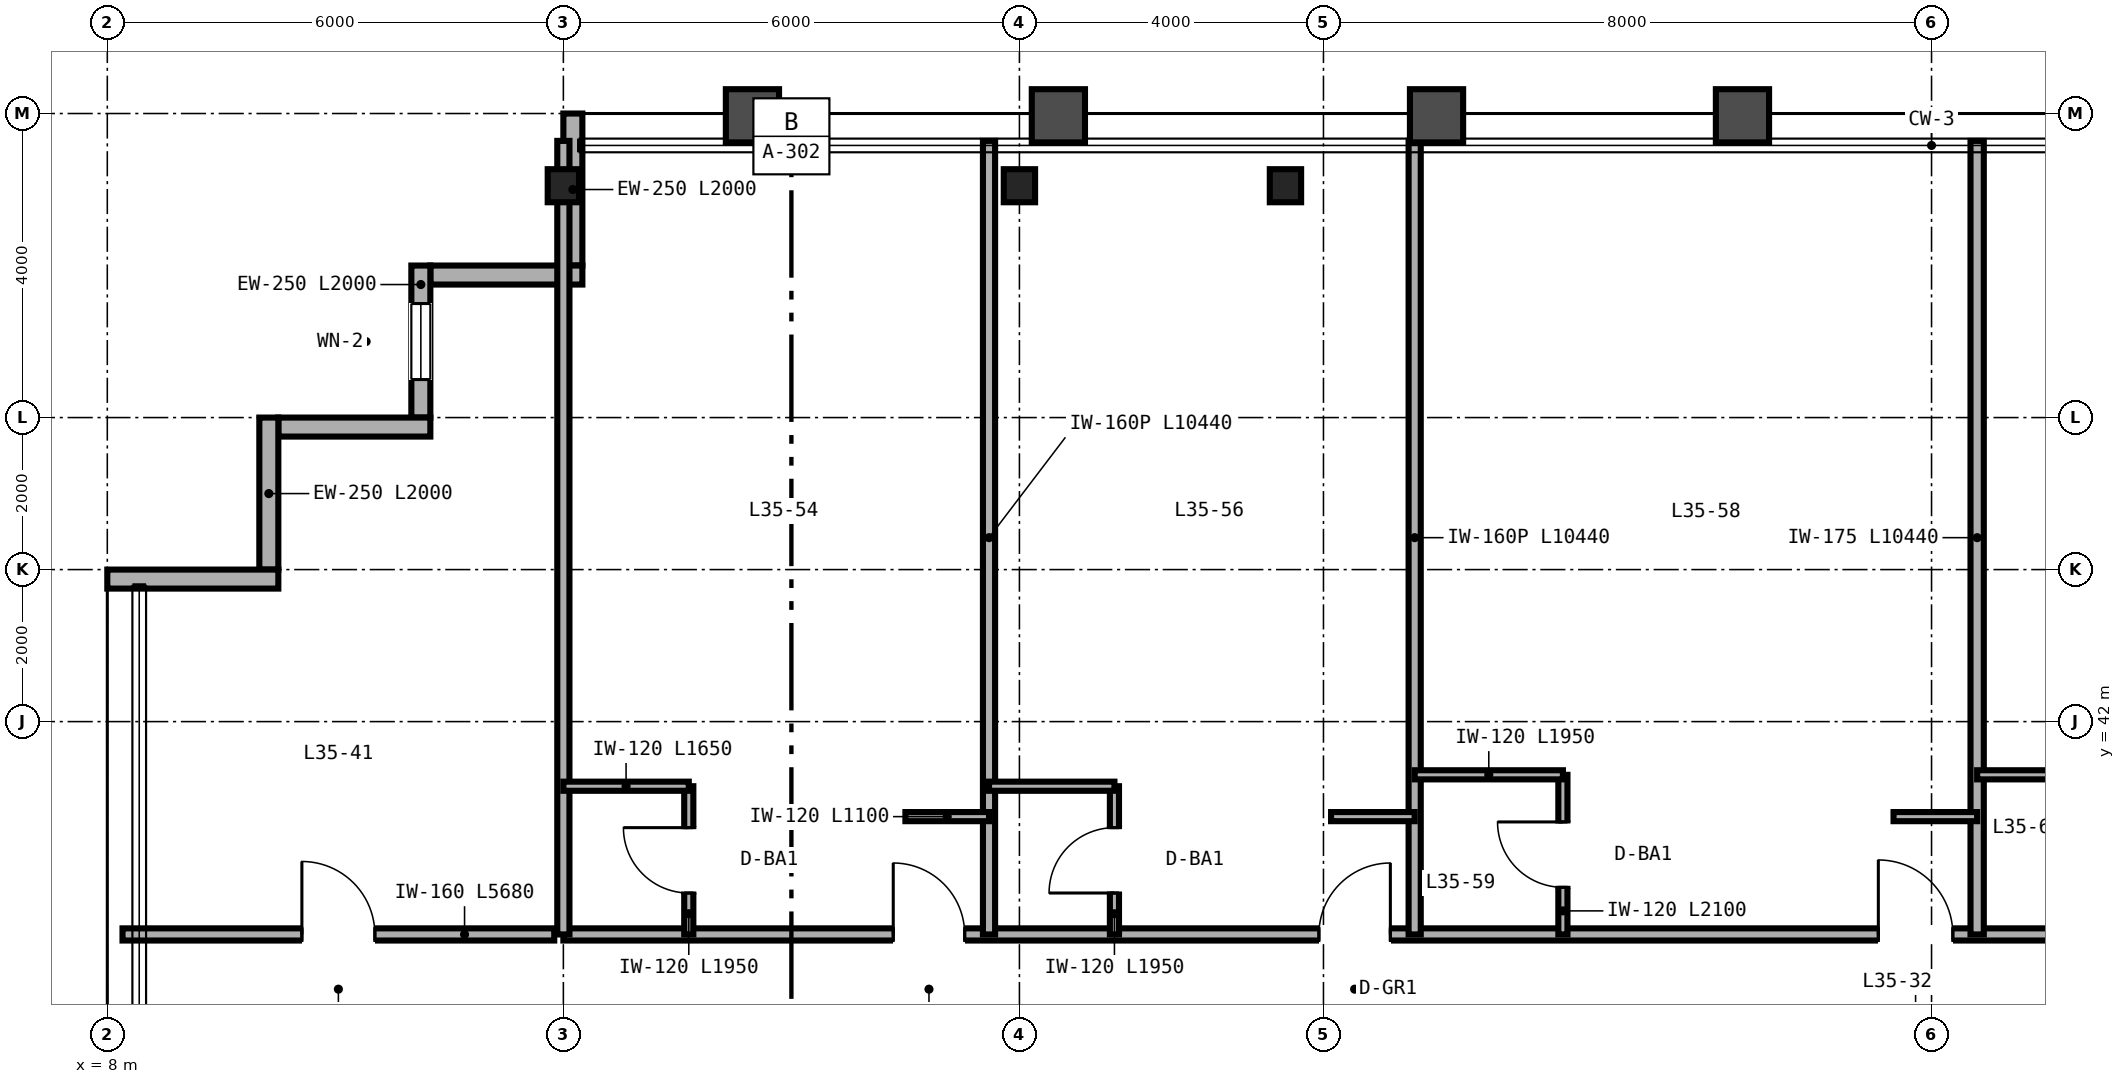
"""IFC4 building model, lengths in metres.
Left out: names, types, materials, properties, quantities, classifications, styles, units other than length and angle.
Written with IfcOpenShell. Run it as: python <this file> out.ifc"""

import sys

from ifc_helpers import new_model, si_unit, direction, frame, frame_2d, origin, origin_2d, place, context, subcontext, project, spatial, rectangle, i_section, extrude, source, transform, mapped, element, fill, save


model = new_model("IFC4")
c1 = context("Model", 3, precision=1e-05, world=origin(), true_north=direction((0.0, 1.0)))
c2 = subcontext(c1, "Body", "Model", "MODEL_VIEW")
j1 = project(units=[si_unit("LENGTHUNIT", "METRE"), si_unit("PLANEANGLEUNIT", "RADIAN")], contexts=[c1])
p1 = place(None, origin())
s1 = spatial("IfcSite", under=j1, at=p1, CompositionType="ELEMENT")
p2 = place(p1, origin())
s2 = spatial("IfcBuilding", under=s1, at=p2, CompositionType="ELEMENT")
p3 = place(p2, frame((0.0, 0.0, 140.4)))
s3 = spatial("IfcBuildingStorey", under=s2, at=p3, CompositionType="ELEMENT", Elevation=140.4)
m1 = source(origin(), c2, "Body", "SweptSolid", [
    extrude(i_section(OverallWidth=0.412, OverallDepth=0.435, WebThickness=0.036, FlangeThickness=0.057, FilletRadius=0.025, at=origin_2d()), origin(), (0.0, 0.0, 1.0), 3.36),
])
for number, where, z_axis, x_axis in (
    (1, (14.0, 49.05, 0.0), (0.0, 0.0, 1.0), (1.0, 0.0, 0.0)),
    (2, (20.0, 49.05, 0.0), (0.0, 0.0, 1.0), (1.0, 0.0, 0.0)),
    (3, (23.5, 49.05, 0.0), (0.0, 0.0, 1.0), (1.0, 0.0, 0.0)),
):
    element("IfcColumn", number, at=place(p3, frame(where, z_axis=z_axis, x_axis=x_axis)), inside=s3, PredefinedType="COLUMN", context=c2, shape_type="MappedRepresentation", body=[
        mapped(m1, transform((0.0, 0.0, 0.0), scale=1.0)),
    ])
p4 = place(p3, frame((14.125, 50.0, 0.0), z_axis=(0.0, 0.0, 1.0), x_axis=(0.0, -1.0, 0.0)))
e4 = element("IfcWall", 4, at=p4, inside=s3, PredefinedType="SOLIDWALL", context=c2, shape_type="SweptSolid", body=[
    extrude(rectangle(XDim=2.0, YDim=0.25, at=frame_2d((1.0, 0.0))), origin(), (0.0, 0.0, 1.0), 2.667),
])
p5 = place(p3, frame((14.25, 47.875, 0.0), z_axis=(0.0, 0.0, 1.0), x_axis=(-1.0, 0.0, 0.0)))
e5 = element("IfcWall", 5, at=p5, inside=s3, PredefinedType="SOLIDWALL", context=c2, shape_type="SweptSolid", body=[
    extrude(rectangle(XDim=2.0, YDim=0.25, at=frame_2d((1.0, 0.0))), origin(), (0.0, 0.0, 1.0), 3.36),
])
p6 = place(p3, frame((12.125, 48.0, 0.0), z_axis=(0.0, 0.0, 1.0), x_axis=(0.0, -1.0, 0.0)))
e6 = element("IfcWall", 6, at=p6, inside=s3, PredefinedType="SOLIDWALL", context=c2, shape_type="SweptSolid", body=[
    extrude(rectangle(XDim=2.0, YDim=0.25, at=frame_2d((1.0, 0.0))), origin(), (0.0, 0.0, 1.0), 3.36),
])
p7 = place(p6, frame((0.5, 0.0, 0.85)))
e7 = element("IfcOpeningElement", 7, at=p7, cuts=e6, PredefinedType="OPENING", context=c2, shape_type="SweptSolid", body=[
    extrude(rectangle(XDim=1.0, YDim=1.9, at=frame_2d((0.5, 0.95))), frame((0.0, 0.135, 0.0), z_axis=(0.0, -1.0, 0.0), x_axis=(1.0, 0.0, 0.0)), (0.0, 0.0, 1.0), 0.27),
])
for number, where, z_axis, x_axis in (
    (8, (12.25, 45.875, 0.0), (0.0, 0.0, 1.0), (-1.0, 0.0, 0.0)),
    (9, (10.125, 46.0, 0.0), (0.0, 0.0, 1.0), (0.0, -1.0, 0.0)),
):
    element("IfcWall", number, at=place(p3, frame(where, z_axis=z_axis, x_axis=x_axis)), inside=s3, PredefinedType="SOLIDWALL", context=c2, shape_type="SweptSolid", body=[
        extrude(rectangle(XDim=2.0, YDim=0.25, at=frame_2d((1.0, 0.0))), origin(), (0.0, 0.0, 1.0), 3.36),
    ])
p8 = place(p3, frame((10.25, 43.875, 0.0), z_axis=(0.0, 0.0, 1.0), x_axis=(-1.0, 0.0, 0.0)))
e10 = element("IfcWall", 10, at=p8, inside=s3, PredefinedType="SOLIDWALL", context=c2, shape_type="SweptSolid", body=[
    extrude(rectangle(XDim=2.25, YDim=0.25, at=frame_2d((1.125, 0.0))), origin(), (0.0, 0.0, 1.0), 3.36),
])
p9 = place(p3, frame((8.2, 39.2, 0.0), z_axis=(0.0, 0.0, 1.0), x_axis=(1.0, 0.0, 0.0)))
e11 = element("IfcWall", 11, at=p9, inside=s3, PredefinedType="PARTITIONING", context=c2, shape_type="SweptSolid", body=[
    extrude(rectangle(XDim=5.68, YDim=0.16, at=frame_2d((2.84, 0.0))), origin(), (0.0, 0.0, 1.0), 3.36),
])
p10 = place(p9, frame((2.36, 0.0, 0.0)))
e12 = element("IfcOpeningElement", 12, at=p10, cuts=e11, PredefinedType="OPENING", context=c2, shape_type="SweptSolid", body=[
    extrude(rectangle(XDim=0.96, YDim=2.15, at=frame_2d((0.48, 1.075))), frame((0.0, 0.09, 0.0), z_axis=(0.0, -1.0, 0.0), x_axis=(1.0, 0.0, 0.0)), (0.0, 0.0, 1.0), 0.18),
])
p11 = place(p3, frame((14.0, 39.2, 0.0), z_axis=(0.0, 0.0, 1.0), x_axis=(1.0, 0.0, 0.0)))
e13 = element("IfcWall", 13, at=p11, inside=s3, PredefinedType="PARTITIONING", context=c2, shape_type="SweptSolid", body=[
    extrude(rectangle(XDim=36.0, YDim=0.16, at=frame_2d((18.0, 0.0))), origin(), (0.0, 0.0, 1.0), 2.581),
])
p12 = place(p11, frame((4.34, 0.0, 0.0)))
e14 = element("IfcOpeningElement", 14, at=p12, cuts=e13, PredefinedType="OPENING", context=c2, shape_type="SweptSolid", body=[
    extrude(rectangle(XDim=0.94, YDim=2.15, at=frame_2d((0.47, 1.075))), frame((0.0, 0.09, 0.0), z_axis=(0.0, -1.0, 0.0), x_axis=(1.0, 0.0, 0.0)), (0.0, 0.0, 1.0), 0.18),
])
p13 = place(p11, frame((9.94, 0.0, 0.0)))
e15 = element("IfcOpeningElement", 15, at=p13, cuts=e13, PredefinedType="OPENING", context=c2, shape_type="SweptSolid", body=[
    extrude(rectangle(XDim=0.94, YDim=2.15, at=frame_2d((0.47, 1.075))), frame((0.0, 0.09, 0.0), z_axis=(0.0, -1.0, 0.0), x_axis=(1.0, 0.0, 0.0)), (0.0, 0.0, 1.0), 0.18),
])
p14 = place(p11, frame((17.3, 0.0, 0.0)))
e16 = element("IfcOpeningElement", 16, at=p14, cuts=e13, PredefinedType="OPENING", context=c2, shape_type="SweptSolid", body=[
    extrude(rectangle(XDim=0.98, YDim=2.2, at=frame_2d((0.49, 1.1))), frame((0.0, 0.09, 0.0), z_axis=(0.0, -1.0, 0.0), x_axis=(1.0, 0.0, 0.0)), (0.0, 0.0, 1.0), 0.18),
])
p15 = place(p11, frame((24.7, 0.0, 0.0)))
e17 = element("IfcOpeningElement", 17, at=p15, cuts=e13, PredefinedType="OPENING", context=c2, shape_type="SweptSolid", body=[
    extrude(rectangle(XDim=0.98, YDim=2.2, at=frame_2d((0.49, 1.1))), frame((0.0, 0.09, 0.0), z_axis=(0.0, -1.0, 0.0), x_axis=(1.0, 0.0, 0.0)), (0.0, 0.0, 1.0), 0.18),
])
p16 = place(p11, frame((28.12, 0.0, 0.0)))
e18 = element("IfcOpeningElement", 18, at=p16, cuts=e13, PredefinedType="OPENING", context=c2, shape_type="SweptSolid", body=[
    extrude(rectangle(XDim=0.96, YDim=2.15, at=frame_2d((0.48, 1.075))), frame((0.0, 0.09, 0.0), z_axis=(0.0, -1.0, 0.0), x_axis=(1.0, 0.0, 0.0)), (0.0, 0.0, 1.0), 0.18),
])
p17 = place(p11, frame((34.74, 0.0, 0.0)))
e19 = element("IfcOpeningElement", 19, at=p17, cuts=e13, PredefinedType="OPENING", context=c2, shape_type="SweptSolid", body=[
    extrude(rectangle(XDim=0.94, YDim=2.15, at=frame_2d((0.47, 1.075))), frame((0.0, 0.09, 0.0), z_axis=(0.0, -1.0, 0.0), x_axis=(1.0, 0.0, 0.0)), (0.0, 0.0, 1.0), 0.18),
])
for number, where, z_axis, x_axis in (
    (20, (14.0, 39.2, 0.0), (0.0, 0.0, 1.0), (0.0, 1.0, 0.0)),
    (21, (19.6, 39.2, 0.0), (0.0, 0.0, 1.0), (0.0, 1.0, 0.0)),
):
    element("IfcWall", number, at=place(p3, frame(where, z_axis=z_axis, x_axis=x_axis)), inside=s3, PredefinedType="PARTITIONING", context=c2, shape_type="SweptSolid", body=[
        extrude(rectangle(XDim=10.44, YDim=0.16, at=frame_2d((5.22, 0.0))), origin(), (0.0, 0.0, 1.0), 2.667),
    ])
p18 = place(p3, frame((15.65, 39.2, 0.0), z_axis=(0.0, 0.0, 1.0), x_axis=(0.0, 1.0, 0.0)))
e22 = element("IfcWall", 22, at=p18, inside=s3, PredefinedType="PARTITIONING", context=c2, shape_type="SweptSolid", body=[
    extrude(rectangle(XDim=1.95, YDim=0.12, at=frame_2d((0.975, 0.0))), origin(), (0.0, 0.0, 1.0), 3.36),
])
p19 = place(p18, frame((0.545, 0.0, 0.0)))
e23 = element("IfcOpeningElement", 23, at=p19, cuts=e22, PredefinedType="OPENING", context=c2, shape_type="SweptSolid", body=[
    extrude(rectangle(XDim=0.86, YDim=2.1, at=frame_2d((0.43, 1.05))), frame((0.0, 0.07, 0.0), z_axis=(0.0, -1.0, 0.0), x_axis=(1.0, 0.0, 0.0)), (0.0, 0.0, 1.0), 0.14),
])
p20 = place(p3, frame((14.0, 41.15, 0.0), z_axis=(0.0, 0.0, 1.0), x_axis=(1.0, 0.0, 0.0)))
e24 = element("IfcWall", 24, at=p20, inside=s3, PredefinedType="PARTITIONING", context=c2, shape_type="SweptSolid", body=[
    extrude(rectangle(XDim=1.65, YDim=0.12, at=frame_2d((0.825, 0.0))), origin(), (0.0, 0.0, 1.0), 3.36),
])
p21 = place(p3, frame((18.5, 40.75, 0.0), z_axis=(0.0, 0.0, 1.0), x_axis=(1.0, 0.0, 0.0)))
e25 = element("IfcWall", 25, at=p21, inside=s3, PredefinedType="PARTITIONING", context=c2, shape_type="SweptSolid", body=[
    extrude(rectangle(XDim=1.1, YDim=0.12, at=frame_2d((0.55, 0.0))), origin(), (0.0, 0.0, 1.0), 3.36),
])
p22 = place(p3, frame((25.2, 39.2, 0.0), z_axis=(0.0, 0.0, 1.0), x_axis=(0.0, 1.0, 0.0)))
e26 = element("IfcWall", 26, at=p22, inside=s3, PredefinedType="PARTITIONING", context=c2, shape_type="SweptSolid", body=[
    extrude(rectangle(XDim=10.44, YDim=0.16, at=frame_2d((5.22, 0.0))), origin(), (0.0, 0.0, 1.0), 2.433),
])
p23 = place(p3, frame((21.25, 39.2, 0.0), z_axis=(0.0, 0.0, 1.0), x_axis=(0.0, 1.0, 0.0)))
e27 = element("IfcWall", 27, at=p23, inside=s3, PredefinedType="PARTITIONING", context=c2, shape_type="SweptSolid", body=[
    extrude(rectangle(XDim=1.95, YDim=0.12, at=frame_2d((0.975, 0.0))), origin(), (0.0, 0.0, 1.0), 3.36),
])
p24 = place(p23, frame((0.545, 0.0, 0.0)))
e28 = element("IfcOpeningElement", 28, at=p24, cuts=e27, PredefinedType="OPENING", context=c2, shape_type="SweptSolid", body=[
    extrude(rectangle(XDim=0.86, YDim=2.1, at=frame_2d((0.43, 1.05))), frame((0.0, 0.07, 0.0), z_axis=(0.0, -1.0, 0.0), x_axis=(1.0, 0.0, 0.0)), (0.0, 0.0, 1.0), 0.14),
])
p25 = place(p3, frame((19.6, 41.15, 0.0), z_axis=(0.0, 0.0, 1.0), x_axis=(1.0, 0.0, 0.0)))
e29 = element("IfcWall", 29, at=p25, inside=s3, PredefinedType="PARTITIONING", context=c2, shape_type="SweptSolid", body=[
    extrude(rectangle(XDim=1.65, YDim=0.12, at=frame_2d((0.825, 0.0))), origin(), (0.0, 0.0, 1.0), 3.36),
])
p26 = place(p3, frame((24.1, 40.75, 0.0), z_axis=(0.0, 0.0, 1.0), x_axis=(1.0, 0.0, 0.0)))
e30 = element("IfcWall", 30, at=p26, inside=s3, PredefinedType="PARTITIONING", context=c2, shape_type="SweptSolid", body=[
    extrude(rectangle(XDim=1.1, YDim=0.12, at=frame_2d((0.55, 0.0))), origin(), (0.0, 0.0, 1.0), 3.36),
])
p27 = place(p3, frame((32.6, 39.2, 0.0), z_axis=(0.0, 0.0, 1.0), x_axis=(0.0, 1.0, 0.0)))
e31 = element("IfcWall", 31, at=p27, inside=s3, PredefinedType="PARTITIONING", context=c2, shape_type="SweptSolid", body=[
    extrude(rectangle(XDim=10.44, YDim=0.175, at=frame_2d((5.22, 0.0))), origin(), (0.0, 0.0, 1.0), 2.433),
])
p28 = place(p3, frame((27.15, 39.2, 0.0), z_axis=(0.0, 0.0, 1.0), x_axis=(0.0, 1.0, 0.0)))
e32 = element("IfcWall", 32, at=p28, inside=s3, PredefinedType="PARTITIONING", context=c2, shape_type="SweptSolid", body=[
    extrude(rectangle(XDim=2.1, YDim=0.12, at=frame_2d((1.05, 0.0))), origin(), (0.0, 0.0, 1.0), 3.36),
])
p29 = place(p28, frame((0.62, 0.0, 0.0)))
e33 = element("IfcOpeningElement", 33, at=p29, cuts=e32, PredefinedType="OPENING", context=c2, shape_type="SweptSolid", body=[
    extrude(rectangle(XDim=0.86, YDim=2.1, at=frame_2d((0.43, 1.05))), frame((0.0, 0.07, 0.0), z_axis=(0.0, -1.0, 0.0), x_axis=(1.0, 0.0, 0.0)), (0.0, 0.0, 1.0), 0.14),
])
p30 = place(p3, frame((25.2, 41.3, 0.0), z_axis=(0.0, 0.0, 1.0), x_axis=(1.0, 0.0, 0.0)))
e34 = element("IfcWall", 34, at=p30, inside=s3, PredefinedType="PARTITIONING", context=c2, shape_type="SweptSolid", body=[
    extrude(rectangle(XDim=1.95, YDim=0.12, at=frame_2d((0.975, 0.0))), origin(), (0.0, 0.0, 1.0), 3.36),
])
p31 = place(p3, frame((31.5, 40.75, 0.0), z_axis=(0.0, 0.0, 1.0), x_axis=(1.0, 0.0, 0.0)))
e35 = element("IfcWall", 35, at=p31, inside=s3, PredefinedType="PARTITIONING", context=c2, shape_type="SweptSolid", body=[
    extrude(rectangle(XDim=1.1, YDim=0.12, at=frame_2d((0.55, 0.0))), origin(), (0.0, 0.0, 1.0), 3.36),
])
p32 = place(p3, frame((32.6, 41.3, 0.0), z_axis=(0.0, 0.0, 1.0), x_axis=(1.0, 0.0, 0.0)))
e36 = element("IfcWall", 36, at=p32, inside=s3, PredefinedType="PARTITIONING", context=c2, shape_type="SweptSolid", body=[
    extrude(rectangle(XDim=1.95, YDim=0.12, at=frame_2d((0.975, 0.0))), origin(), (0.0, 0.0, 1.0), 3.36),
])
m2 = source(origin(), c2, "Body", "SweptSolid", [
    extrude(rectangle(XDim=1.0, YDim=1.9, at=frame_2d((0.5, 0.95))), frame((0.0, 0.03, 0.0), z_axis=(0.0, -1.0, 0.0), x_axis=(1.0, 0.0, 0.0)), (0.0, 0.0, 1.0), 0.06),
])
p33 = place(p7, origin())
e37 = element("IfcWindow", 37, at=p33, inside=s3, PartitioningType="SINGLE_PANEL", PredefinedType="WINDOW", context=c2, shape_type="MappedRepresentation", body=[
    mapped(m2, transform((0.0, 0.0, 0.0), scale=1.0)),
])
fill(e7, e37)
m3 = source(origin(), c2, "Body", "SweptSolid", [
    extrude(rectangle(XDim=0.96, YDim=2.15, at=frame_2d((0.48, 1.075))), frame((0.0, 0.025, 0.0), z_axis=(0.0, -1.0, 0.0), x_axis=(1.0, 0.0, 0.0)), (0.0, 0.0, 1.0), 0.05),
])
p34 = place(p10, origin())
e38 = element("IfcDoor", 38, at=p34, inside=s3, OperationType="SINGLE_SWING_LEFT", PredefinedType="DOOR", context=c2, shape_type="MappedRepresentation", body=[
    mapped(m3, transform((0.0, 0.0, 0.0), scale=1.0)),
])
fill(e12, e38)
m4 = source(origin(), c2, "Body", "SweptSolid", [
    extrude(rectangle(XDim=0.86, YDim=2.1, at=frame_2d((0.43, 1.05))), frame((0.0, 0.025, 0.0), z_axis=(0.0, -1.0, 0.0), x_axis=(1.0, 0.0, 0.0)), (0.0, 0.0, 1.0), 0.05),
])
p35 = place(p19, origin())
e39 = element("IfcDoor", 39, at=p35, inside=s3, OperationType="SINGLE_SWING_RIGHT", PredefinedType="DOOR", context=c2, shape_type="MappedRepresentation", body=[
    mapped(m4, transform((0.0, 0.0, 0.0), scale=1.0)),
])
fill(e23, e39)
p36 = place(p24, origin())
e40 = element("IfcDoor", 40, at=p36, inside=s3, OperationType="SINGLE_SWING_LEFT", PredefinedType="DOOR", context=c2, shape_type="MappedRepresentation", body=[
    mapped(m4, transform((0.0, 0.0, 0.0), scale=1.0)),
])
fill(e28, e40)
p37 = place(p29, origin())
e41 = element("IfcDoor", 41, at=p37, inside=s3, OperationType="SINGLE_SWING_RIGHT", PredefinedType="DOOR", context=c2, shape_type="MappedRepresentation", body=[
    mapped(m4, transform((0.0, 0.0, 0.0), scale=1.0)),
])
fill(e33, e41)
m5 = source(origin(), c2, "Body", "SweptSolid", [
    extrude(rectangle(XDim=0.94, YDim=2.15, at=frame_2d((0.47, 1.075))), frame((0.0, 0.025, 0.0), z_axis=(0.0, -1.0, 0.0), x_axis=(1.0, 0.0, 0.0)), (0.0, 0.0, 1.0), 0.05),
])
p38 = place(p12, origin())
e42 = element("IfcDoor", 42, at=p38, inside=s3, OperationType="SINGLE_SWING_LEFT", PredefinedType="DOOR", context=c2, shape_type="MappedRepresentation", body=[
    mapped(m5, transform((0.0, 0.0, 0.0), scale=1.0)),
])
fill(e14, e42)
p39 = place(p13, origin())
e43 = element("IfcDoor", 43, at=p39, inside=s3, OperationType="SINGLE_SWING_RIGHT", PredefinedType="DOOR", context=c2, shape_type="MappedRepresentation", body=[
    mapped(m5, transform((0.0, 0.0, 0.0), scale=1.0)),
])
fill(e15, e43)
m6 = source(origin(), c2, "Body", "SweptSolid", [
    extrude(rectangle(XDim=0.98, YDim=2.2, at=frame_2d((0.49, 1.1))), frame((0.0, 0.025, 0.0), z_axis=(0.0, -1.0, 0.0), x_axis=(1.0, 0.0, 0.0)), (0.0, 0.0, 1.0), 0.05),
])
p40 = place(p14, origin())
e44 = element("IfcDoor", 44, at=p40, inside=s3, OperationType="SINGLE_SWING_LEFT", PredefinedType="DOOR", context=c2, shape_type="MappedRepresentation", body=[
    mapped(m6, transform((0.0, 0.0, 0.0), scale=1.0)),
])
fill(e16, e44)
save(model, sys.argv[1])
